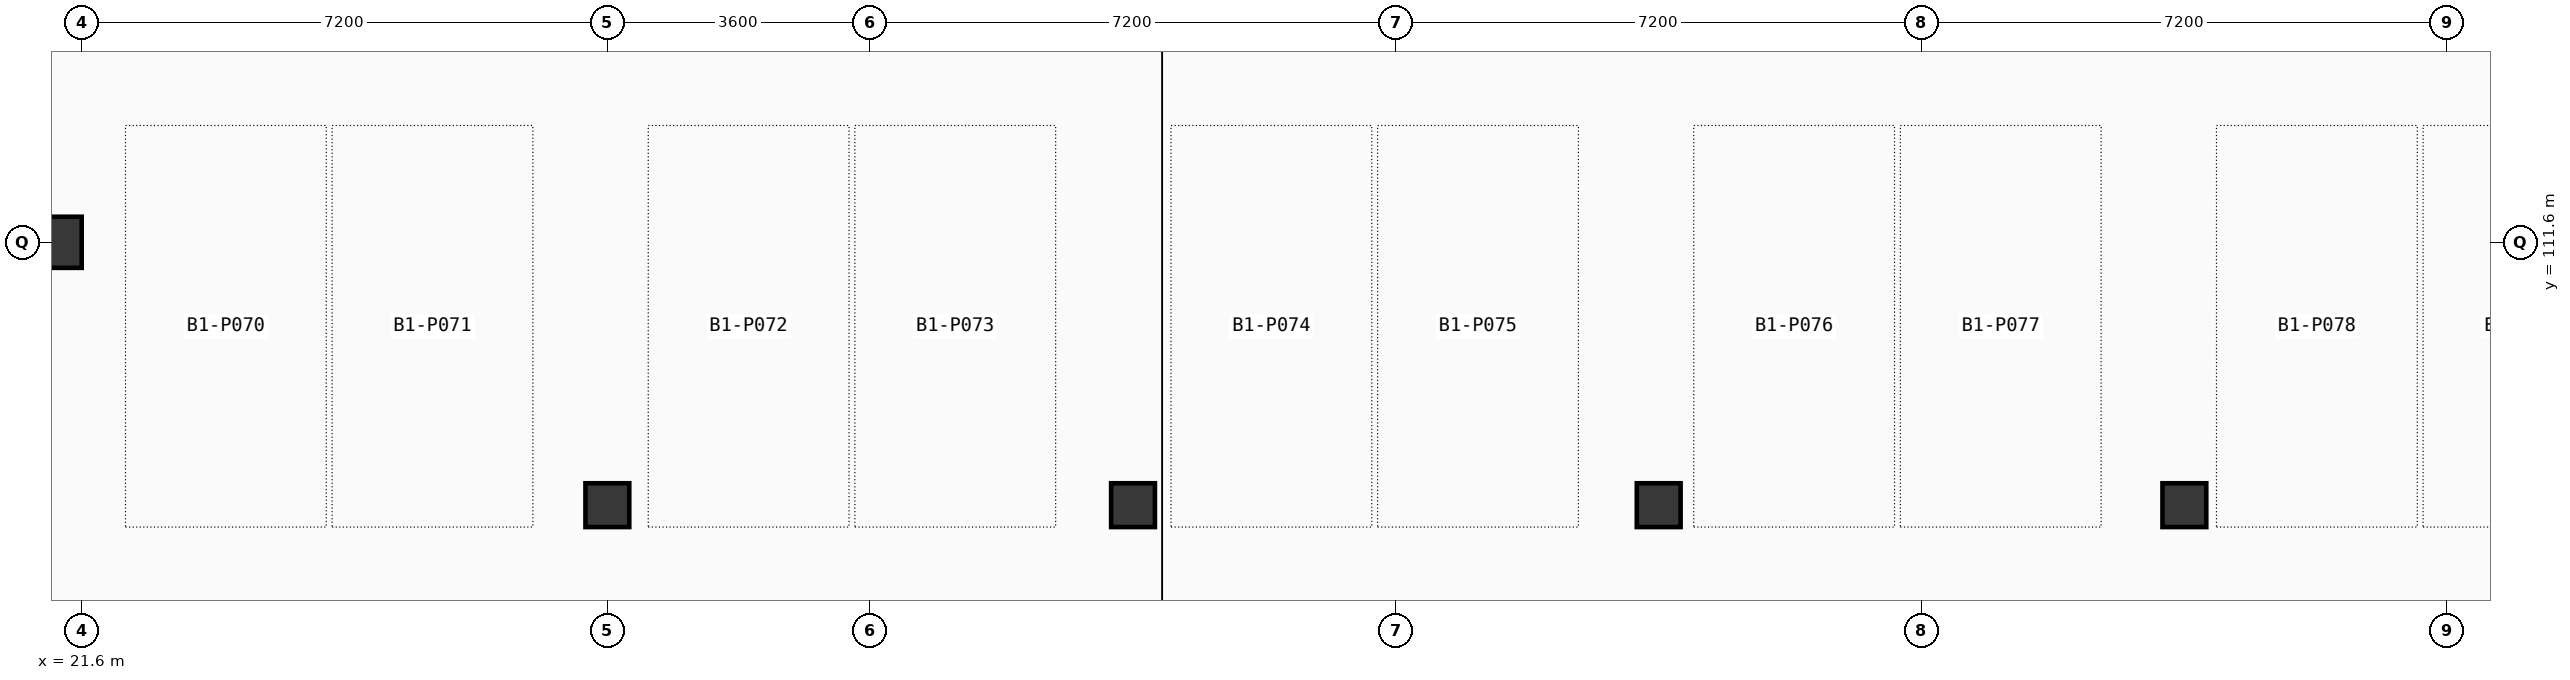
"""IFC4 building model, lengths in metres.
Left out: names, types, materials, properties, quantities, classifications, styles, units other than length and angle.
Written with IfcOpenShell. Run it as: python <this file> out.ifc"""

import sys

from ifc_helpers import new_model, si_unit, direction, frame, origin, origin_2d, place, context, subcontext, project, spatial, rectangle, extrude, element, save


model = new_model("IFC4")
c1 = context("Model", 3, precision=1e-05, world=origin(), true_north=direction((0.0, 1.0)))
c2 = subcontext(c1, "Body", "Model", "MODEL_VIEW")
j1 = project(units=[si_unit("LENGTHUNIT", "METRE"), si_unit("PLANEANGLEUNIT", "RADIAN")], contexts=[c1])
p1 = place(None, origin())
s1 = spatial("IfcSite", under=j1, at=p1, CompositionType="ELEMENT")
p2 = place(p1, origin())
s2 = spatial("IfcBuilding", under=s1, at=p2, CompositionType="ELEMENT")
p3 = place(p2, frame((0.0, 0.0, -4.2)))
s3 = spatial("IfcBuildingStorey", under=s2, at=p3, CompositionType="ELEMENT", Elevation=-4.2)
for number, where, z_axis, x_axis in (
    (1, (28.8, 108.0, 0.0), (0.0, 0.0, 1.0), (1.0, 0.0, 0.0)),
    (2, (36.0, 108.0, 0.0), (0.0, 0.0, 1.0), (1.0, 0.0, 0.0)),
    (3, (43.2, 108.0, 0.0), (0.0, 0.0, 1.0), (1.0, 0.0, 0.0)),
    (4, (50.4, 108.0, 0.0), (0.0, 0.0, 1.0), (1.0, 0.0, 0.0)),
):
    element("IfcColumn", number, at=place(p3, frame(where, z_axis=z_axis, x_axis=x_axis)), inside=s3, PredefinedType="COLUMN", context=c2, shape_type="SweptSolid", body=[
        extrude(rectangle(XDim=0.6, YDim=0.6, at=origin_2d()), origin(), (0.0, 0.0, 1.0), 4.2),
    ])
p4 = place(p3, frame((21.25, 111.6, 0.0), z_axis=(0.0, 0.0, 1.0), x_axis=(1.0, 0.0, 0.0)))
e5 = element("IfcColumn", 5, at=p4, inside=s3, PredefinedType="COLUMN", context=c2, shape_type="SweptSolid", body=[
    extrude(rectangle(XDim=0.7, YDim=0.7, at=origin_2d()), origin(), (0.0, 0.0, 1.0), 4.2),
])
save(model, sys.argv[1])
